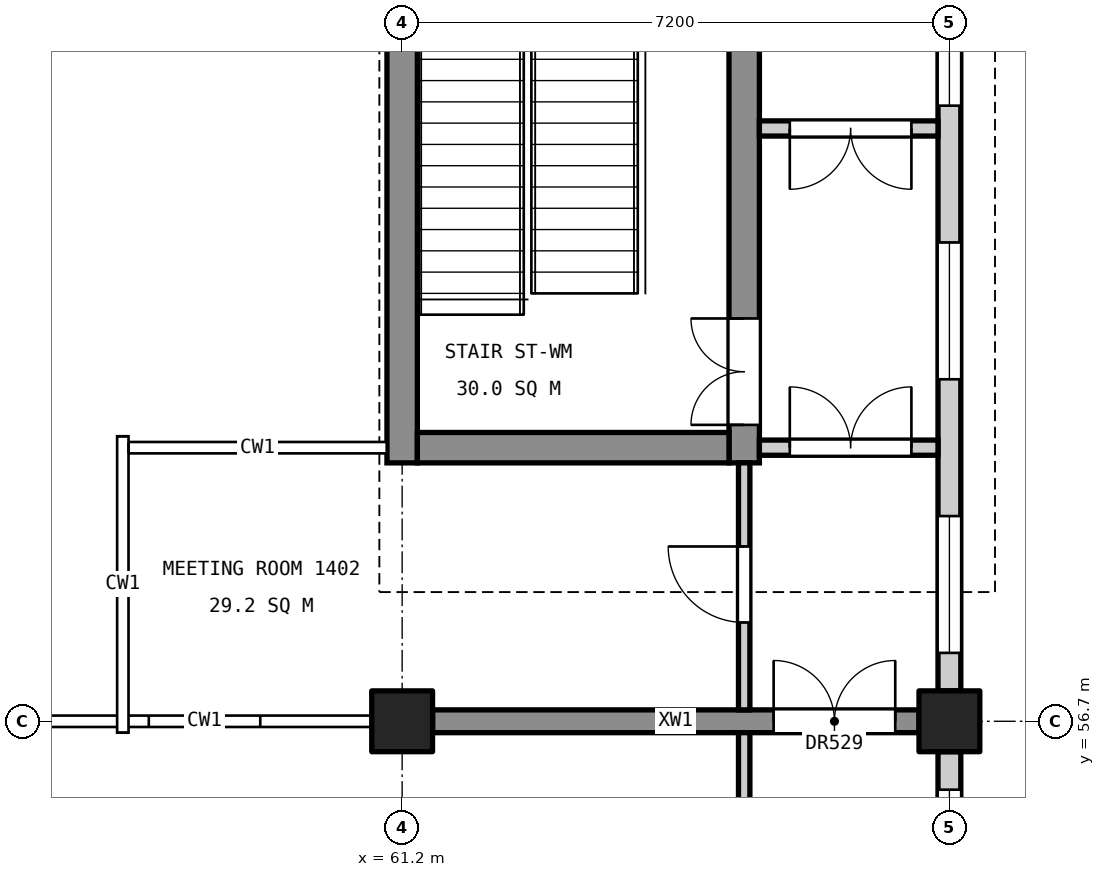
"""IFC4 building model, lengths in metres.
Left out: names, types, materials, properties, quantities, classifications, styles, units other than length and angle.
Written with IfcOpenShell. Run it as: python <this file> out.ifc"""

import sys

from ifc_helpers import new_model, si_unit, direction, frame, frame_2d, origin, origin_2d, place, context, subcontext, project, spatial, rectangle, extrude, element, fill, save


model = new_model("IFC4")
c1 = context("Model", 3, precision=1e-05, world=origin(), true_north=direction((0.0, 1.0)))
c2 = subcontext(c1, "Body", "Model", "MODEL_VIEW")
j1 = project(units=[si_unit("LENGTHUNIT", "METRE"), si_unit("PLANEANGLEUNIT", "RADIAN")], contexts=[c1])
p1 = place(None, origin())
s1 = spatial("IfcSite", under=j1, at=p1, CompositionType="ELEMENT")
p2 = place(p1, origin())
s2 = spatial("IfcBuilding", under=s1, at=p2, CompositionType="ELEMENT")
p3 = place(p2, frame((0.0, 0.0, 70.2)))
s3 = spatial("IfcBuildingStorey", under=s2, at=p3, CompositionType="ELEMENT", Elevation=70.2)
for number, where, z_axis, x_axis in (
    (1, (61.2, 56.7, 0.0), (0.0, 0.0, 1.0), (1.0, 0.0, 0.0)),
    (2, (68.4, 56.7, 0.0), (0.0, 0.0, 1.0), (1.0, 0.0, 0.0)),
):
    element("IfcColumn", number, at=place(p3, frame(where, z_axis=z_axis, x_axis=x_axis)), inside=s3, PredefinedType="COLUMN", context=c2, shape_type="SweptSolid", body=[
        extrude(rectangle(XDim=0.8, YDim=0.8, at=origin_2d()), origin(), (0.0, 0.0, 1.0), 4.8),
    ])
p4 = place(p3, frame((61.2, 60.1, 0.0), z_axis=(0.0, 0.0, 1.0), x_axis=(0.0, 1.0, 0.0)))
e3 = element("IfcWall", 3, at=p4, inside=s3, PredefinedType="SHEAR", context=c2, shape_type="SweptSolid", body=[
    extrude(rectangle(XDim=14.8, YDim=0.4, at=frame_2d((7.4, 0.0))), origin(), (0.0, 0.0, 1.0), 4.55),
])
p5 = place(p4, frame((6.11, 0.0, 3.4)))
e4 = element("IfcOpeningElement", 4, at=p5, cuts=e3, PredefinedType="OPENING", context=c2, shape_type="SweptSolid", body=[
    extrude(rectangle(XDim=1.2, YDim=0.9, at=frame_2d((0.6, 0.45))), frame((0.0, 0.21, 0.0), z_axis=(0.0, -1.0, 0.0), x_axis=(1.0, 0.0, 0.0)), (0.0, 0.0, 1.0), 0.42),
])
p6 = place(p3, frame((65.7, 60.1, 0.0), z_axis=(0.0, 0.0, 1.0), x_axis=(0.0, 1.0, 0.0)))
e5 = element("IfcWall", 5, at=p6, inside=s3, PredefinedType="SHEAR", context=c2, shape_type="SweptSolid", body=[
    extrude(rectangle(XDim=14.8, YDim=0.4, at=frame_2d((7.4, 0.0))), origin(), (0.0, 0.0, 1.0), 4.55),
])
p7 = place(p6, frame((0.5, 0.0, 0.0)))
e6 = element("IfcOpeningElement", 6, at=p7, cuts=e5, PredefinedType="OPENING", context=c2, shape_type="SweptSolid", body=[
    extrude(rectangle(XDim=1.4, YDim=2.1, at=frame_2d((0.7, 1.05))), frame((0.0, 0.21, 0.0), z_axis=(0.0, -1.0, 0.0), x_axis=(1.0, 0.0, 0.0)), (0.0, 0.0, 1.0), 0.42),
])
p8 = place(p6, frame((8.8, 0.0, 0.0)))
e7 = element("IfcOpeningElement", 7, at=p8, cuts=e5, PredefinedType="OPENING", context=c2, shape_type="SweptSolid", body=[
    extrude(rectangle(XDim=1.1, YDim=2.1, at=frame_2d((0.55, 1.05))), frame((0.0, 0.21, 0.0), z_axis=(0.0, -1.0, 0.0), x_axis=(1.0, 0.0, 0.0)), (0.0, 0.0, 1.0), 0.42),
])
p9 = place(p6, frame((11.35, 0.0, 0.0)))
e8 = element("IfcOpeningElement", 8, at=p9, cuts=e5, PredefinedType="OPENING", context=c2, shape_type="SweptSolid", body=[
    extrude(rectangle(XDim=1.1, YDim=2.1, at=frame_2d((0.55, 1.05))), frame((0.0, 0.21, 0.0), z_axis=(0.0, -1.0, 0.0), x_axis=(1.0, 0.0, 0.0)), (0.0, 0.0, 1.0), 0.42),
])
p10 = place(p3, frame((61.4, 60.3, 0.0), z_axis=(0.0, 0.0, 1.0), x_axis=(1.0, 0.0, 0.0)))
e9 = element("IfcWall", 9, at=p10, inside=s3, PredefinedType="SHEAR", context=c2, shape_type="SweptSolid", body=[
    extrude(rectangle(XDim=4.1, YDim=0.4, at=frame_2d((2.05, 0.0))), origin(), (0.0, 0.0, 1.0), 4.55),
])
p11 = place(p3, frame((61.6, 56.7, 0.0), z_axis=(0.0, 0.0, 1.0), x_axis=(1.0, 0.0, 0.0)))
e10 = element("IfcWall", 10, at=p11, inside=s3, PredefinedType="SHEAR", context=c2, shape_type="SweptSolid", body=[
    extrude(rectangle(XDim=6.4, YDim=0.3, at=frame_2d((3.2, 0.0))), origin(), (0.0, 0.0, 1.0), 4.55),
])
p12 = place(p11, frame((4.488, 0.0, 0.0)))
e11 = element("IfcOpeningElement", 11, at=p12, cuts=e10, PredefinedType="OPENING", context=c2, shape_type="SweptSolid", body=[
    extrude(rectangle(XDim=1.6, YDim=2.1, at=frame_2d((0.8, 1.05))), frame((0.0, 0.16, 0.0), z_axis=(0.0, -1.0, 0.0), x_axis=(1.0, 0.0, 0.0)), (0.0, 0.0, 1.0), 0.32),
])
p13 = place(p3, frame((68.4, 46.3, 0.0), z_axis=(0.0, 0.0, 1.0), x_axis=(0.0, 1.0, 0.0)))
e12 = element("IfcWall", 12, at=p13, inside=s3, PredefinedType="STANDARD", context=c2, shape_type="SweptSolid", body=[
    extrude(rectangle(XDim=10.0, YDim=0.3, at=frame_2d((5.0, 0.0))), origin(), (0.0, 0.0, 1.0), 3.55),
])
p14 = place(p13, frame((0.5, 0.0, 0.9)))
e13 = element("IfcOpeningElement", 13, at=p14, cuts=e12, PredefinedType="OPENING", context=c2, shape_type="SweptSolid", body=[
    extrude(rectangle(XDim=1.8, YDim=2.4, at=frame_2d((0.9, 1.2))), frame((0.0, 0.16, 0.0), z_axis=(0.0, -1.0, 0.0), x_axis=(1.0, 0.0, 0.0)), (0.0, 0.0, 1.0), 0.32),
])
p15 = place(p13, frame((4.1, 0.0, 0.9)))
e14 = element("IfcOpeningElement", 14, at=p15, cuts=e12, PredefinedType="OPENING", context=c2, shape_type="SweptSolid", body=[
    extrude(rectangle(XDim=1.8, YDim=2.4, at=frame_2d((0.9, 1.2))), frame((0.0, 0.16, 0.0), z_axis=(0.0, -1.0, 0.0), x_axis=(1.0, 0.0, 0.0)), (0.0, 0.0, 1.0), 0.32),
])
p16 = place(p13, frame((7.7, 0.0, 0.9)))
e15 = element("IfcOpeningElement", 15, at=p16, cuts=e12, PredefinedType="OPENING", context=c2, shape_type="SweptSolid", body=[
    extrude(rectangle(XDim=1.8, YDim=2.4, at=frame_2d((0.9, 1.2))), frame((0.0, 0.16, 0.0), z_axis=(0.0, -1.0, 0.0), x_axis=(1.0, 0.0, 0.0)), (0.0, 0.0, 1.0), 0.32),
])
p17 = place(p3, frame((68.4, 57.1, 0.0), z_axis=(0.0, 0.0, 1.0), x_axis=(0.0, 1.0, 0.0)))
e16 = element("IfcWall", 16, at=p17, inside=s3, PredefinedType="STANDARD", context=c2, shape_type="SweptSolid", body=[
    extrude(rectangle(XDim=10.0, YDim=0.3, at=frame_2d((5.0, 0.0))), origin(), (0.0, 0.0, 1.0), 3.55),
])
p18 = place(p17, frame((0.5, 0.0, 0.9)))
e17 = element("IfcOpeningElement", 17, at=p18, cuts=e16, PredefinedType="OPENING", context=c2, shape_type="SweptSolid", body=[
    extrude(rectangle(XDim=1.8, YDim=2.4, at=frame_2d((0.9, 1.2))), frame((0.0, 0.16, 0.0), z_axis=(0.0, -1.0, 0.0), x_axis=(1.0, 0.0, 0.0)), (0.0, 0.0, 1.0), 0.32),
])
p19 = place(p17, frame((4.1, 0.0, 0.9)))
e18 = element("IfcOpeningElement", 18, at=p19, cuts=e16, PredefinedType="OPENING", context=c2, shape_type="SweptSolid", body=[
    extrude(rectangle(XDim=1.8, YDim=2.4, at=frame_2d((0.9, 1.2))), frame((0.0, 0.16, 0.0), z_axis=(0.0, -1.0, 0.0), x_axis=(1.0, 0.0, 0.0)), (0.0, 0.0, 1.0), 0.32),
])
p20 = place(p17, frame((7.7, 0.0, 0.9)))
e19 = element("IfcOpeningElement", 19, at=p20, cuts=e16, PredefinedType="OPENING", context=c2, shape_type="SweptSolid", body=[
    extrude(rectangle(XDim=1.8, YDim=2.4, at=frame_2d((0.9, 1.2))), frame((0.0, 0.16, 0.0), z_axis=(0.0, -1.0, 0.0), x_axis=(1.0, 0.0, 0.0)), (0.0, 0.0, 1.0), 0.32),
])
p21 = place(p3, frame((65.7, 46.1, 0.0), z_axis=(0.0, 0.0, 1.0), x_axis=(0.0, 1.0, 0.0)))
e20 = element("IfcWall", 20, at=p21, inside=s3, PredefinedType="PARTITIONING", context=c2, shape_type="SweptSolid", body=[
    extrude(rectangle(XDim=10.45, YDim=0.15, at=frame_2d((5.225, 0.0))), origin(), (0.0, 0.0, 1.0), 3.55),
])
p22 = place(p21, frame((4.7, 0.0, 0.0)))
e21 = element("IfcOpeningElement", 21, at=p22, cuts=e20, PredefinedType="OPENING", context=c2, shape_type="SweptSolid", body=[
    extrude(rectangle(XDim=1.0, YDim=2.1, at=frame_2d((0.5, 1.05))), frame((0.0, 0.085, 0.0), z_axis=(0.0, -1.0, 0.0), x_axis=(1.0, 0.0, 0.0)), (0.0, 0.0, 1.0), 0.17),
])
p23 = place(p3, frame((65.7, 56.85, 0.0), z_axis=(0.0, 0.0, 1.0), x_axis=(0.0, 1.0, 0.0)))
e22 = element("IfcWall", 22, at=p23, inside=s3, PredefinedType="PARTITIONING", context=c2, shape_type="SweptSolid", body=[
    extrude(rectangle(XDim=3.25, YDim=0.15, at=frame_2d((1.625, 0.0))), origin(), (0.0, 0.0, 1.0), 3.55),
])
p24 = place(p23, frame((1.15, 0.0, 0.0)))
e23 = element("IfcOpeningElement", 23, at=p24, cuts=e22, PredefinedType="OPENING", context=c2, shape_type="SweptSolid", body=[
    extrude(rectangle(XDim=1.0, YDim=2.1, at=frame_2d((0.5, 1.05))), frame((0.0, 0.085, 0.0), z_axis=(0.0, -1.0, 0.0), x_axis=(1.0, 0.0, 0.0)), (0.0, 0.0, 1.0), 0.17),
])
p25 = place(p3, frame((65.9, 60.3, 0.0), z_axis=(0.0, 0.0, 1.0), x_axis=(1.0, 0.0, 0.0)))
e24 = element("IfcWall", 24, at=p25, inside=s3, PredefinedType="PARTITIONING", context=c2, shape_type="SweptSolid", body=[
    extrude(rectangle(XDim=2.35, YDim=0.2, at=frame_2d((1.175, 0.0))), origin(), (0.0, 0.0, 1.0), 3.85),
])
p26 = place(p25, frame((0.4, 0.0, 0.0)))
e25 = element("IfcOpeningElement", 25, at=p26, cuts=e24, PredefinedType="OPENING", context=c2, shape_type="SweptSolid", body=[
    extrude(rectangle(XDim=1.6, YDim=2.1, at=frame_2d((0.8, 1.05))), frame((0.0, 0.11, 0.0), z_axis=(0.0, -1.0, 0.0), x_axis=(1.0, 0.0, 0.0)), (0.0, 0.0, 1.0), 0.22),
])
p27 = place(p3, frame((65.9, 64.5, 0.0), z_axis=(0.0, 0.0, 1.0), x_axis=(1.0, 0.0, 0.0)))
e26 = element("IfcWall", 26, at=p27, inside=s3, PredefinedType="PARTITIONING", context=c2, shape_type="SweptSolid", body=[
    extrude(rectangle(XDim=2.35, YDim=0.2, at=frame_2d((1.175, 0.0))), origin(), (0.0, 0.0, 1.0), 3.55),
])
p28 = place(p27, frame((0.4, 0.0, 0.0)))
e27 = element("IfcOpeningElement", 27, at=p28, cuts=e26, PredefinedType="OPENING", context=c2, shape_type="SweptSolid", body=[
    extrude(rectangle(XDim=1.6, YDim=2.1, at=frame_2d((0.8, 1.05))), frame((0.0, 0.11, 0.0), z_axis=(0.0, -1.0, 0.0), x_axis=(1.0, 0.0, 0.0)), (0.0, 0.0, 1.0), 0.22),
])
p29 = place(p7, origin())
e28 = element("IfcDoor", 28, at=p29, inside=s3, OperationType="DOUBLE_DOOR_SINGLE_SWING", PredefinedType="DOOR", context=c2, shape_type="SweptSolid", body=[
    extrude(rectangle(XDim=1.4, YDim=2.1, at=frame_2d((0.7, 1.05))), frame((0.0, 0.025, 0.0), z_axis=(0.0, -1.0, 0.0), x_axis=(1.0, 0.0, 0.0)), (0.0, 0.0, 1.0), 0.05),
])
fill(e6, e28)
p30 = place(p16, origin())
e29 = element("IfcWindow", 29, at=p30, inside=s3, PartitioningType="SINGLE_PANEL", PredefinedType="WINDOW", context=c2, shape_type="SweptSolid", body=[
    extrude(rectangle(XDim=1.8, YDim=2.4, at=frame_2d((0.9, 1.2))), frame((0.0, 0.03, 0.0), z_axis=(0.0, -1.0, 0.0), x_axis=(1.0, 0.0, 0.0)), (0.0, 0.0, 1.0), 0.06),
])
fill(e15, e29)
p31 = place(p18, origin())
e30 = element("IfcWindow", 30, at=p31, inside=s3, PartitioningType="SINGLE_PANEL", PredefinedType="WINDOW", context=c2, shape_type="SweptSolid", body=[
    extrude(rectangle(XDim=1.8, YDim=2.4, at=frame_2d((0.9, 1.2))), frame((0.0, 0.03, 0.0), z_axis=(0.0, -1.0, 0.0), x_axis=(1.0, 0.0, 0.0)), (0.0, 0.0, 1.0), 0.06),
])
fill(e17, e30)
p32 = place(p19, origin())
e31 = element("IfcWindow", 31, at=p32, inside=s3, PartitioningType="SINGLE_PANEL", PredefinedType="WINDOW", context=c2, shape_type="SweptSolid", body=[
    extrude(rectangle(XDim=1.8, YDim=2.4, at=frame_2d((0.9, 1.2))), frame((0.0, 0.03, 0.0), z_axis=(0.0, -1.0, 0.0), x_axis=(1.0, 0.0, 0.0)), (0.0, 0.0, 1.0), 0.06),
])
fill(e18, e31)
p33 = place(p20, origin())
e32 = element("IfcWindow", 32, at=p33, inside=s3, PartitioningType="SINGLE_PANEL", PredefinedType="WINDOW", context=c2, shape_type="SweptSolid", body=[
    extrude(rectangle(XDim=1.8, YDim=2.4, at=frame_2d((0.9, 1.2))), frame((0.0, 0.03, 0.0), z_axis=(0.0, -1.0, 0.0), x_axis=(1.0, 0.0, 0.0)), (0.0, 0.0, 1.0), 0.06),
])
fill(e19, e32)
p34 = place(p24, origin())
e33 = element("IfcDoor", 33, at=p34, inside=s3, OperationType="SINGLE_SWING_RIGHT", PredefinedType="DOOR", context=c2, shape_type="SweptSolid", body=[
    extrude(rectangle(XDim=1.0, YDim=2.1, at=frame_2d((0.5, 1.05))), frame((0.0, 0.025, 0.0), z_axis=(0.0, -1.0, 0.0), x_axis=(1.0, 0.0, 0.0)), (0.0, 0.0, 1.0), 0.05),
])
fill(e23, e33)
p35 = place(p26, origin())
e34 = element("IfcDoor", 34, at=p35, inside=s3, OperationType="DOUBLE_DOOR_SINGLE_SWING", PredefinedType="DOOR", context=c2, shape_type="SweptSolid", body=[
    extrude(rectangle(XDim=1.6, YDim=2.1, at=frame_2d((0.8, 1.05))), frame((0.0, 0.025, 0.0), z_axis=(0.0, -1.0, 0.0), x_axis=(1.0, 0.0, 0.0)), (0.0, 0.0, 1.0), 0.05),
])
fill(e25, e34)
p36 = place(p28, frame((1.6, 0.0, 0.0), z_axis=(0.0, 0.0, 1.0), x_axis=(-1.0, 0.0, 0.0)))
e35 = element("IfcDoor", 35, at=p36, inside=s3, OperationType="DOUBLE_DOOR_SINGLE_SWING", PredefinedType="DOOR", context=c2, shape_type="SweptSolid", body=[
    extrude(rectangle(XDim=1.6, YDim=2.1, at=frame_2d((0.8, 1.05))), frame((0.0, 0.025, 0.0), z_axis=(0.0, -1.0, 0.0), x_axis=(1.0, 0.0, 0.0)), (0.0, 0.0, 1.0), 0.05),
])
fill(e27, e35)
p37 = place(p12, origin())
e36 = element("IfcDoor", 36, at=p37, inside=s3, OperationType="DOUBLE_DOOR_SINGLE_SWING", PredefinedType="DOOR", context=c2, shape_type="SweptSolid", body=[
    extrude(rectangle(XDim=1.6, YDim=2.1, at=frame_2d((0.8, 1.05))), frame((0.0, 0.025, 0.0), z_axis=(0.0, -1.0, 0.0), x_axis=(1.0, 0.0, 0.0)), (0.0, 0.0, 1.0), 0.05),
])
fill(e11, e36)
save(model, sys.argv[1])
